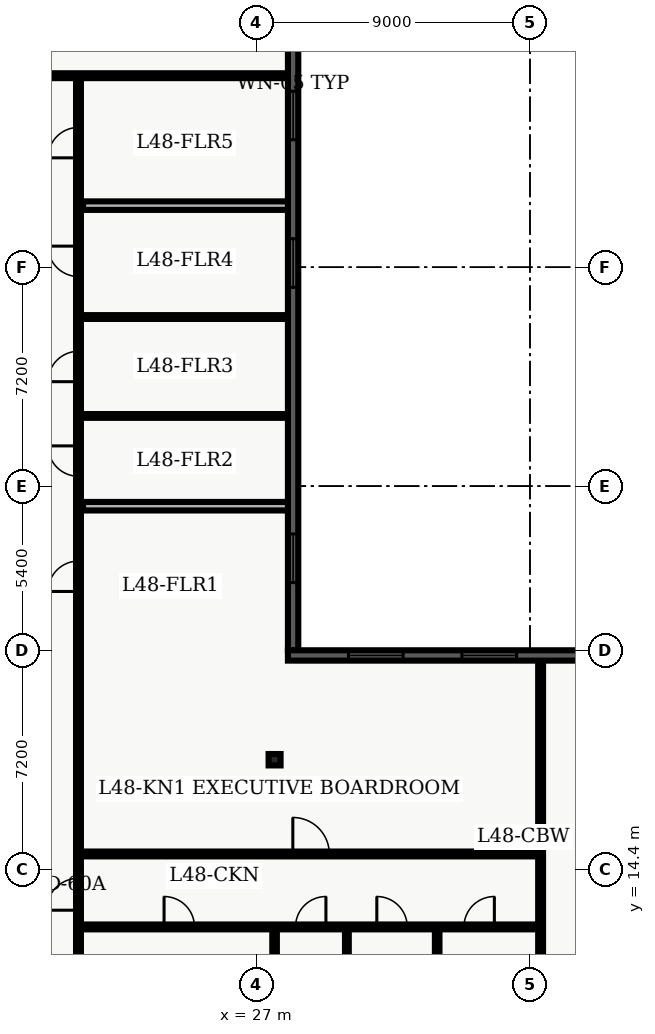
"""IFC4 building model, lengths in metres.
Left out: names, types, materials, properties, quantities, classifications, styles, units other than length and angle.
Written with IfcOpenShell. Run it as: python <this file> out.ifc"""

import sys

from ifc_helpers import new_model, entity, si_unit, converted_unit, direction, frame, origin_with_axes, origin_2d_with_axis, place, context, subcontext, project, spatial, polyline, rectangle, i_section, outline, extrude, element, fill, save


model = new_model("IFC4")
c1 = context("Model", 3, precision=1e-05, world=origin_with_axes(), true_north=direction((0.0, 1.0)))
c2 = subcontext(c1, "Body", "Model", "MODEL_VIEW")
j1 = project(units=[si_unit("LENGTHUNIT", "METRE"), converted_unit("PLANEANGLEUNIT", "DEGREE", entity("IfcPlaneAngleMeasure", 0.017), si_unit("PLANEANGLEUNIT", "RADIAN"), dimensions=[0, 0, 0, 0, 0, 0, 0])], contexts=[c1])
p1 = place(None, origin_with_axes())
s1 = spatial("IfcSite", under=j1, at=p1, CompositionType="ELEMENT")
p2 = place(p1, origin_with_axes())
s2 = spatial("IfcBuilding", under=s1, at=p2, CompositionType="ELEMENT")
p3 = place(p2, frame((0.0, 0.0, 196.5), z_axis=(0.0, 0.0, 1.0), x_axis=(1.0, 0.0, 0.0)))
s3 = spatial("IfcBuildingStorey", under=s2, at=p3, CompositionType="ELEMENT", Elevation=196.5)
p4 = place(p3, frame((27.6, 18.0, 0.0), z_axis=(0.0, 0.0, 1.0), x_axis=(1.0, 0.0, 0.0)))
e1 = element("IfcColumn", 1, at=p4, inside=s3, PredefinedType="COLUMN", context=c2, shape_type="SweptSolid", body=[
    extrude(i_section(OverallWidth=0.394, OverallDepth=0.375, WebThickness=0.017, FlangeThickness=0.028, FilletRadius=0.02, at=origin_2d_with_axis()), origin_with_axes(), (0.0, 0.0, 1.0), 3.9),
])
p5 = place(p3, frame((2.6, 40.5, 0.0), z_axis=(0.0, 0.0, 1.0), x_axis=(1.0, 0.0, 0.0)))
e2 = element("IfcWall", 2, at=p5, inside=s3, PredefinedType="PARTITIONING", context=c2, shape_type="SweptSolid", body=[
    extrude(outline(polyline([(0.0, -0.08), (25.444, -0.08), (25.444, 0.08), (0.0, 0.08), (0.0, -0.08)])), origin_with_axes(), (0.0, 0.0, 1.0), 2.7),
])
p6 = place(p5, frame((1.762, 0.0, 0.0), z_axis=(0.0, 0.0, 1.0), x_axis=(1.0, 0.0, 0.0)))
e3 = element("IfcOpeningElement", 3, at=p6, cuts=e2, PredefinedType="OPENING", context=c2, shape_type="SweptSolid", body=[
    extrude(rectangle(XDim=1.0, YDim=0.18, at=origin_2d_with_axis()), origin_with_axes(), (0.0, 0.0, 1.0), 2.15),
])
p7 = place(p5, frame((6.167, 0.0, 0.0), z_axis=(0.0, 0.0, 1.0), x_axis=(1.0, 0.0, 0.0)))
e4 = element("IfcOpeningElement", 4, at=p7, cuts=e2, PredefinedType="OPENING", context=c2, shape_type="SweptSolid", body=[
    extrude(rectangle(XDim=1.0, YDim=0.18, at=origin_2d_with_axis()), origin_with_axes(), (0.0, 0.0, 1.0), 2.15),
])
p8 = place(p5, frame((10.413, 0.0, 0.0), z_axis=(0.0, 0.0, 1.0), x_axis=(1.0, 0.0, 0.0)))
e5 = element("IfcOpeningElement", 5, at=p8, cuts=e2, PredefinedType="OPENING", context=c2, shape_type="SweptSolid", body=[
    extrude(rectangle(XDim=1.0, YDim=0.18, at=origin_2d_with_axis()), origin_with_axes(), (0.0, 0.0, 1.0), 2.15),
])
p9 = place(p5, frame((14.773, 0.0, 0.0), z_axis=(0.0, 0.0, 1.0), x_axis=(1.0, 0.0, 0.0)))
e6 = element("IfcOpeningElement", 6, at=p9, cuts=e2, PredefinedType="OPENING", context=c2, shape_type="SweptSolid", body=[
    extrude(rectangle(XDim=1.0, YDim=0.18, at=origin_2d_with_axis()), origin_with_axes(), (0.0, 0.0, 1.0), 2.15),
])
p10 = place(p3, frame((21.15, 7.8, 0.0), z_axis=(0.0, 0.0, 1.0), x_axis=(0.0, 1.0, 0.0)))
e7 = element("IfcWall", 7, at=p10, inside=s3, PredefinedType="PARTITIONING", context=c2, shape_type="SweptSolid", body=[
    extrude(outline(polyline([(0.0, -0.08), (32.7, -0.08), (32.7, 0.08), (0.0, 0.08), (0.0, -0.08)])), origin_with_axes(), (0.0, 0.0, 1.0), 2.7),
])
p11 = place(p10, frame((16.235, 0.0, 0.0), z_axis=(0.0, 0.0, 1.0), x_axis=(1.0, 0.0, 0.0)))
e8 = element("IfcOpeningElement", 8, at=p11, cuts=e7, PredefinedType="OPENING", context=c2, shape_type="SweptSolid", body=[
    extrude(rectangle(XDim=1.0, YDim=0.18, at=origin_2d_with_axis()), origin_with_axes(), (0.0, 0.0, 1.0), 2.15),
])
p12 = place(p10, frame((20.023, 0.0, 0.0), z_axis=(0.0, 0.0, 1.0), x_axis=(1.0, 0.0, 0.0)))
e9 = element("IfcOpeningElement", 9, at=p12, cuts=e7, PredefinedType="OPENING", context=c2, shape_type="SweptSolid", body=[
    extrude(rectangle(XDim=1.0, YDim=0.18, at=origin_2d_with_axis()), origin_with_axes(), (0.0, 0.0, 1.0), 2.15),
])
p13 = place(p10, frame((23.135, 0.0, 0.0), z_axis=(0.0, 0.0, 1.0), x_axis=(1.0, 0.0, 0.0)))
e10 = element("IfcOpeningElement", 10, at=p13, cuts=e7, PredefinedType="OPENING", context=c2, shape_type="SweptSolid", body=[
    extrude(rectangle(XDim=1.0, YDim=0.18, at=origin_2d_with_axis()), origin_with_axes(), (0.0, 0.0, 1.0), 2.15),
])
p14 = place(p10, frame((26.594, 0.0, 0.0), z_axis=(0.0, 0.0, 1.0), x_axis=(1.0, 0.0, 0.0)))
e11 = element("IfcOpeningElement", 11, at=p14, cuts=e7, PredefinedType="OPENING", context=c2, shape_type="SweptSolid", body=[
    extrude(rectangle(XDim=1.0, YDim=0.18, at=origin_2d_with_axis()), origin_with_axes(), (0.0, 0.0, 1.0), 2.15),
])
p15 = place(p10, frame((30.498, 0.0, 0.0), z_axis=(0.0, 0.0, 1.0), x_axis=(1.0, 0.0, 0.0)))
e12 = element("IfcOpeningElement", 12, at=p15, cuts=e7, PredefinedType="OPENING", context=c2, shape_type="SweptSolid", body=[
    extrude(rectangle(XDim=1.0, YDim=0.18, at=origin_2d_with_axis()), origin_with_axes(), (0.0, 0.0, 1.0), 2.15),
])
p16 = place(p10, frame((5.775, 0.0, 0.0), z_axis=(0.0, 0.0, 1.0), x_axis=(1.0, 0.0, 0.0)))
e13 = element("IfcOpeningElement", 13, at=p16, cuts=e7, PredefinedType="OPENING", context=c2, shape_type="SweptSolid", body=[
    extrude(rectangle(XDim=1.05, YDim=0.18, at=origin_2d_with_axis()), origin_with_axes(), (0.0, 0.0, 1.0), 2.15),
])
p17 = place(p3, frame((21.3, 26.339, 0.0), z_axis=(0.0, 0.0, 1.0), x_axis=(1.0, 0.0, 0.0)))
e14 = element("IfcWall", 14, at=p17, inside=s3, PredefinedType="PARTITIONING", context=c2, shape_type="SweptSolid", body=[
    extrude(outline(polyline([(0.0, -0.14), (6.744, -0.14), (6.744, 0.14), (0.0, 0.14), (0.0, -0.14)])), origin_with_axes(), (0.0, 0.0, 1.0), 2.7),
])
for number, where, z_axis, x_axis in (
    (15, (21.3, 29.308, 0.0), (0.0, 0.0, 1.0), (1.0, 0.0, 0.0)),
    (16, (21.3, 32.562, 0.0), (0.0, 0.0, 1.0), (1.0, 0.0, 0.0)),
):
    element("IfcWall", number, at=place(p3, frame(where, z_axis=z_axis, x_axis=x_axis)), inside=s3, PredefinedType="PARTITIONING", context=c2, shape_type="SweptSolid", body=[
        extrude(outline(polyline([(0.0, -0.062), (6.744, -0.062), (6.744, 0.062), (0.0, 0.062), (0.0, -0.062)])), origin_with_axes(), (0.0, 0.0, 1.0), 2.7),
    ])
p18 = place(p3, frame((21.3, 36.226, 0.0), z_axis=(0.0, 0.0, 1.0), x_axis=(1.0, 0.0, 0.0)))
e17 = element("IfcWall", 17, at=p18, inside=s3, PredefinedType="PARTITIONING", context=c2, shape_type="SweptSolid", body=[
    extrude(outline(polyline([(0.0, -0.14), (6.744, -0.14), (6.744, 0.14), (0.0, 0.14), (0.0, -0.14)])), origin_with_axes(), (0.0, 0.0, 1.0), 2.7),
])
p19 = place(p3, frame((21.15, 12.5, 0.0), z_axis=(0.0, 0.0, 1.0), x_axis=(1.0, 0.0, 0.0)))
e18 = element("IfcWall", 18, at=p19, inside=s3, PredefinedType="PARTITIONING", context=c2, shape_type="SweptSolid", body=[
    extrude(outline(polyline([(0.0, -0.08), (15.2, -0.08), (15.2, 0.08), (0.0, 0.08), (0.0, -0.08)])), origin_with_axes(), (0.0, 0.0, 1.0), 2.7),
])
p20 = place(p19, frame((3.315, 0.0, 0.0), z_axis=(0.0, 0.0, 1.0), x_axis=(1.0, 0.0, 0.0)))
e19 = element("IfcOpeningElement", 19, at=p20, cuts=e18, PredefinedType="OPENING", context=c2, shape_type="SweptSolid", body=[
    extrude(rectangle(XDim=1.0, YDim=0.18, at=origin_2d_with_axis()), origin_with_axes(), (0.0, 0.0, 1.0), 2.15),
])
p21 = place(p19, frame((7.639, 0.0, 0.0), z_axis=(0.0, 0.0, 1.0), x_axis=(1.0, 0.0, 0.0)))
e20 = element("IfcOpeningElement", 20, at=p21, cuts=e18, PredefinedType="OPENING", context=c2, shape_type="SweptSolid", body=[
    extrude(rectangle(XDim=1.0, YDim=0.18, at=origin_2d_with_axis()), origin_with_axes(), (0.0, 0.0, 1.0), 2.15),
])
p22 = place(p19, frame((10.313, 0.0, 0.0), z_axis=(0.0, 0.0, 1.0), x_axis=(1.0, 0.0, 0.0)))
e21 = element("IfcOpeningElement", 21, at=p22, cuts=e18, PredefinedType="OPENING", context=c2, shape_type="SweptSolid", body=[
    extrude(rectangle(XDim=1.0, YDim=0.18, at=origin_2d_with_axis()), origin_with_axes(), (0.0, 0.0, 1.0), 2.15),
])
p23 = place(p19, frame((13.179, 0.0, 0.0), z_axis=(0.0, 0.0, 1.0), x_axis=(1.0, 0.0, 0.0)))
e22 = element("IfcOpeningElement", 22, at=p23, cuts=e18, PredefinedType="OPENING", context=c2, shape_type="SweptSolid", body=[
    extrude(rectangle(XDim=1.0, YDim=0.18, at=origin_2d_with_axis()), origin_with_axes(), (0.0, 0.0, 1.0), 2.15),
])
p24 = place(p3, frame((21.15, 14.9, 0.0), z_axis=(0.0, 0.0, 1.0), x_axis=(1.0, 0.0, 0.0)))
e23 = element("IfcWall", 23, at=p24, inside=s3, PredefinedType="PARTITIONING", context=c2, shape_type="SweptSolid", body=[
    extrude(outline(polyline([(0.0, -0.08), (15.2, -0.08), (15.2, 0.08), (0.0, 0.08), (0.0, -0.08)])), origin_with_axes(), (0.0, 0.0, 1.0), 2.7),
])
p25 = place(p24, frame((7.65, 0.0, 0.0), z_axis=(0.0, 0.0, 1.0), x_axis=(1.0, 0.0, 0.0)))
e24 = element("IfcOpeningElement", 24, at=p25, cuts=e23, PredefinedType="OPENING", context=c2, shape_type="SweptSolid", body=[
    extrude(rectangle(XDim=1.2, YDim=0.18, at=origin_2d_with_axis()), origin_with_axes(), (0.0, 0.0, 1.0), 2.2),
])
p26 = place(p3, frame((36.35, 4.35, 0.0), z_axis=(0.0, 0.0, 1.0), x_axis=(0.0, 1.0, 0.0)))
e25 = element("IfcWall", 25, at=p26, inside=s3, PredefinedType="PARTITIONING", context=c2, shape_type="SweptSolid", body=[
    extrude(outline(polyline([(0.0, -0.08), (16.95, -0.08), (16.95, 0.08), (0.0, 0.08), (0.0, -0.08)])), origin_with_axes(), (0.0, 0.0, 1.0), 2.7),
])
p27 = place(p3, frame((27.6, 0.335, 0.0), z_axis=(0.0, 0.0, 1.0), x_axis=(0.0, 1.0, 0.0)))
e26 = element("IfcWall", 26, at=p27, inside=s3, PredefinedType="PARTITIONING", context=c2, shape_type="SweptSolid", body=[
    extrude(outline(polyline([(0.0, -0.075), (12.045, -0.075), (12.045, 0.075), (0.0, 0.075), (0.0, -0.075)])), origin_with_axes(), (0.0, 0.0, 1.0), 2.7),
])
p28 = place(p3, frame((29.978, 0.335, 0.0), z_axis=(0.0, 0.0, 1.0), x_axis=(0.0, 1.0, 0.0)))
e27 = element("IfcWall", 27, at=p28, inside=s3, PredefinedType="PARTITIONING", context=c2, shape_type="SweptSolid", body=[
    extrude(outline(polyline([(0.0, -0.062), (12.045, -0.062), (12.045, 0.062), (0.0, 0.062), (0.0, -0.062)])), origin_with_axes(), (0.0, 0.0, 1.0), 2.7),
])
p29 = place(p3, frame((32.948, 0.335, 0.0), z_axis=(0.0, 0.0, 1.0), x_axis=(0.0, 1.0, 0.0)))
e28 = element("IfcWall", 28, at=p29, inside=s3, PredefinedType="PARTITIONING", context=c2, shape_type="SweptSolid", body=[
    extrude(outline(polyline([(0.0, -0.075), (12.045, -0.075), (12.045, 0.075), (0.0, 0.075), (0.0, -0.075)])), origin_with_axes(), (0.0, 0.0, 1.0), 2.7),
])
p30 = place(p3, frame((28.209, 42.22, 0.0), z_axis=(0.0, 0.0, 1.0), x_axis=(0.0, -1.0, 0.0)))
e29 = element("IfcWall", 29, at=p30, inside=s3, PredefinedType="SOLIDWALL", context=c2, shape_type="SweptSolid", body=[
    extrude(outline(polyline([(0.0, -0.17), (20.62, -0.17), (20.62, 0.17), (0.0, 0.17), (0.0, -0.17)])), origin_with_axes(), (0.0, 0.0, 1.0), 3.66),
])
p31 = place(p30, frame((3.028, 0.0, 0.45), z_axis=(0.0, 0.0, 1.0), x_axis=(1.0, 0.0, 0.0)))
e30 = element("IfcOpeningElement", 30, at=p31, cuts=e29, PredefinedType="OPENING", context=c2, shape_type="SweptSolid", body=[
    extrude(rectangle(XDim=1.6, YDim=0.36, at=origin_2d_with_axis()), origin_with_axes(), (0.0, 0.0, 1.0), 2.2),
])
p32 = place(p30, frame((7.882, 0.0, 0.45), z_axis=(0.0, 0.0, 1.0), x_axis=(1.0, 0.0, 0.0)))
e31 = element("IfcOpeningElement", 31, at=p32, cuts=e29, PredefinedType="OPENING", context=c2, shape_type="SweptSolid", body=[
    extrude(rectangle(XDim=1.6, YDim=0.36, at=origin_2d_with_axis()), origin_with_axes(), (0.0, 0.0, 1.0), 2.2),
])
p33 = place(p30, frame((17.593, 0.0, 0.45), z_axis=(0.0, 0.0, 1.0), x_axis=(1.0, 0.0, 0.0)))
e32 = element("IfcOpeningElement", 32, at=p33, cuts=e29, PredefinedType="OPENING", context=c2, shape_type="SweptSolid", body=[
    extrude(rectangle(XDim=1.6, YDim=0.36, at=origin_2d_with_axis()), origin_with_axes(), (0.0, 0.0, 1.0), 2.2),
])
p34 = place(p3, frame((28.039, 21.43, 0.0), z_axis=(0.0, 0.0, 1.0), x_axis=(1.0, 0.0, 0.0)))
e33 = element("IfcWall", 33, at=p34, inside=s3, PredefinedType="SOLIDWALL", context=c2, shape_type="SweptSolid", body=[
    extrude(outline(polyline([(0.0, -0.17), (10.361, -0.17), (10.361, 0.17), (0.0, 0.17), (0.0, -0.17)])), origin_with_axes(), (0.0, 0.0, 1.0), 3.66),
])
p35 = place(p34, frame((2.89, 0.0, 0.45), z_axis=(0.0, 0.0, 1.0), x_axis=(1.0, 0.0, 0.0)))
e34 = element("IfcOpeningElement", 34, at=p35, cuts=e33, PredefinedType="OPENING", context=c2, shape_type="SweptSolid", body=[
    extrude(rectangle(XDim=1.8, YDim=0.36, at=origin_2d_with_axis()), origin_with_axes(), (0.0, 0.0, 1.0), 2.1),
])
p36 = place(p34, frame((6.621, 0.0, 0.45), z_axis=(0.0, 0.0, 1.0), x_axis=(1.0, 0.0, 0.0)))
e35 = element("IfcOpeningElement", 35, at=p36, cuts=e33, PredefinedType="OPENING", context=c2, shape_type="SweptSolid", body=[
    extrude(rectangle(XDim=1.8, YDim=0.36, at=origin_2d_with_axis()), origin_with_axes(), (0.0, 0.0, 1.0), 2.1),
])
p37 = place(p10, frame((16.235, 0.0, 0.0), z_axis=(0.0, 0.0, 1.0), x_axis=(1.0, 0.0, 0.0)))
e36 = element("IfcDoor", 36, at=p37, inside=s3, OperationType="SINGLE_SWING_LEFT", PredefinedType="DOOR", context=c2, shape_type="SweptSolid", body=[
    extrude(rectangle(XDim=1.0, YDim=0.09, at=origin_2d_with_axis()), origin_with_axes(), (0.0, 0.0, 1.0), 2.15),
])
fill(e8, e36)
p38 = place(p10, frame((20.023, 0.0, 0.0), z_axis=(0.0, 0.0, 1.0), x_axis=(1.0, 0.0, 0.0)))
e37 = element("IfcDoor", 37, at=p38, inside=s3, OperationType="SINGLE_SWING_RIGHT", PredefinedType="DOOR", context=c2, shape_type="SweptSolid", body=[
    extrude(rectangle(XDim=1.0, YDim=0.09, at=origin_2d_with_axis()), origin_with_axes(), (0.0, 0.0, 1.0), 2.15),
])
fill(e9, e37)
p39 = place(p10, frame((23.135, 0.0, 0.0), z_axis=(0.0, 0.0, 1.0), x_axis=(1.0, 0.0, 0.0)))
e38 = element("IfcDoor", 38, at=p39, inside=s3, OperationType="SINGLE_SWING_LEFT", PredefinedType="DOOR", context=c2, shape_type="SweptSolid", body=[
    extrude(rectangle(XDim=1.0, YDim=0.09, at=origin_2d_with_axis()), origin_with_axes(), (0.0, 0.0, 1.0), 2.15),
])
fill(e10, e38)
p40 = place(p10, frame((26.594, 0.0, 0.0), z_axis=(0.0, 0.0, 1.0), x_axis=(1.0, 0.0, 0.0)))
e39 = element("IfcDoor", 39, at=p40, inside=s3, OperationType="SINGLE_SWING_RIGHT", PredefinedType="DOOR", context=c2, shape_type="SweptSolid", body=[
    extrude(rectangle(XDim=1.0, YDim=0.09, at=origin_2d_with_axis()), origin_with_axes(), (0.0, 0.0, 1.0), 2.15),
])
fill(e11, e39)
p41 = place(p10, frame((30.498, 0.0, 0.0), z_axis=(0.0, 0.0, 1.0), x_axis=(1.0, 0.0, 0.0)))
e40 = element("IfcDoor", 40, at=p41, inside=s3, OperationType="SINGLE_SWING_LEFT", PredefinedType="DOOR", context=c2, shape_type="SweptSolid", body=[
    extrude(rectangle(XDim=1.0, YDim=0.09, at=origin_2d_with_axis()), origin_with_axes(), (0.0, 0.0, 1.0), 2.15),
])
fill(e12, e40)
p42 = place(p10, frame((5.775, 0.0, 0.0), z_axis=(0.0, 0.0, 1.0), x_axis=(1.0, 0.0, 0.0)))
e41 = element("IfcDoor", 41, at=p42, inside=s3, OperationType="SINGLE_SWING_LEFT", PredefinedType="DOOR", context=c2, shape_type="SweptSolid", body=[
    extrude(rectangle(XDim=1.05, YDim=0.09, at=origin_2d_with_axis()), origin_with_axes(), (0.0, 0.0, 1.0), 2.15),
])
fill(e13, e41)
p43 = place(p19, frame((3.315, 0.0, 0.0), z_axis=(0.0, 0.0, 1.0), x_axis=(1.0, 0.0, 0.0)))
e42 = element("IfcDoor", 42, at=p43, inside=s3, OperationType="SINGLE_SWING_LEFT", PredefinedType="DOOR", context=c2, shape_type="SweptSolid", body=[
    extrude(rectangle(XDim=1.0, YDim=0.09, at=origin_2d_with_axis()), origin_with_axes(), (0.0, 0.0, 1.0), 2.15),
])
fill(e19, e42)
p44 = place(p19, frame((7.639, 0.0, 0.0), z_axis=(0.0, 0.0, 1.0), x_axis=(1.0, 0.0, 0.0)))
e43 = element("IfcDoor", 43, at=p44, inside=s3, OperationType="SINGLE_SWING_RIGHT", PredefinedType="DOOR", context=c2, shape_type="SweptSolid", body=[
    extrude(rectangle(XDim=1.0, YDim=0.09, at=origin_2d_with_axis()), origin_with_axes(), (0.0, 0.0, 1.0), 2.15),
])
fill(e20, e43)
p45 = place(p19, frame((10.313, 0.0, 0.0), z_axis=(0.0, 0.0, 1.0), x_axis=(1.0, 0.0, 0.0)))
e44 = element("IfcDoor", 44, at=p45, inside=s3, OperationType="SINGLE_SWING_LEFT", PredefinedType="DOOR", context=c2, shape_type="SweptSolid", body=[
    extrude(rectangle(XDim=1.0, YDim=0.09, at=origin_2d_with_axis()), origin_with_axes(), (0.0, 0.0, 1.0), 2.15),
])
fill(e21, e44)
p46 = place(p19, frame((13.179, 0.0, 0.0), z_axis=(0.0, 0.0, 1.0), x_axis=(1.0, 0.0, 0.0)))
e45 = element("IfcDoor", 45, at=p46, inside=s3, OperationType="SINGLE_SWING_RIGHT", PredefinedType="DOOR", context=c2, shape_type="SweptSolid", body=[
    extrude(rectangle(XDim=1.0, YDim=0.09, at=origin_2d_with_axis()), origin_with_axes(), (0.0, 0.0, 1.0), 2.15),
])
fill(e22, e45)
p47 = place(p24, frame((7.65, 0.0, 0.0), z_axis=(0.0, 0.0, 1.0), x_axis=(1.0, 0.0, 0.0)))
e46 = element("IfcDoor", 46, at=p47, inside=s3, OperationType="SINGLE_SWING_LEFT", PredefinedType="DOOR", context=c2, shape_type="SweptSolid", body=[
    extrude(rectangle(XDim=1.2, YDim=0.09, at=origin_2d_with_axis()), origin_with_axes(), (0.0, 0.0, 1.0), 2.2),
])
fill(e24, e46)
p48 = place(p30, frame((3.028, 0.0, 0.45), z_axis=(0.0, 0.0, 1.0), x_axis=(1.0, 0.0, 0.0)))
e47 = element("IfcWindow", 47, at=p48, inside=s3, PredefinedType="WINDOW", context=c2, shape_type="SweptSolid", body=[
    extrude(rectangle(XDim=1.6, YDim=0.09, at=origin_2d_with_axis()), origin_with_axes(), (0.0, 0.0, 1.0), 2.2),
])
fill(e30, e47)
p49 = place(p30, frame((7.882, 0.0, 0.45), z_axis=(0.0, 0.0, 1.0), x_axis=(1.0, 0.0, 0.0)))
e48 = element("IfcWindow", 48, at=p49, inside=s3, PredefinedType="WINDOW", context=c2, shape_type="SweptSolid", body=[
    extrude(rectangle(XDim=1.6, YDim=0.09, at=origin_2d_with_axis()), origin_with_axes(), (0.0, 0.0, 1.0), 2.2),
])
fill(e31, e48)
p50 = place(p30, frame((17.593, 0.0, 0.45), z_axis=(0.0, 0.0, 1.0), x_axis=(1.0, 0.0, 0.0)))
e49 = element("IfcWindow", 49, at=p50, inside=s3, PredefinedType="WINDOW", context=c2, shape_type="SweptSolid", body=[
    extrude(rectangle(XDim=1.6, YDim=0.09, at=origin_2d_with_axis()), origin_with_axes(), (0.0, 0.0, 1.0), 2.2),
])
fill(e32, e49)
p51 = place(p34, frame((2.89, 0.0, 0.45), z_axis=(0.0, 0.0, 1.0), x_axis=(1.0, 0.0, 0.0)))
e50 = element("IfcWindow", 50, at=p51, inside=s3, PredefinedType="WINDOW", context=c2, shape_type="SweptSolid", body=[
    extrude(rectangle(XDim=1.8, YDim=0.09, at=origin_2d_with_axis()), origin_with_axes(), (0.0, 0.0, 1.0), 2.1),
])
fill(e34, e50)
p52 = place(p34, frame((6.621, 0.0, 0.45), z_axis=(0.0, 0.0, 1.0), x_axis=(1.0, 0.0, 0.0)))
e51 = element("IfcWindow", 51, at=p52, inside=s3, PredefinedType="WINDOW", context=c2, shape_type="SweptSolid", body=[
    extrude(rectangle(XDim=1.8, YDim=0.09, at=origin_2d_with_axis()), origin_with_axes(), (0.0, 0.0, 1.0), 2.1),
])
fill(e35, e51)
save(model, sys.argv[1])
